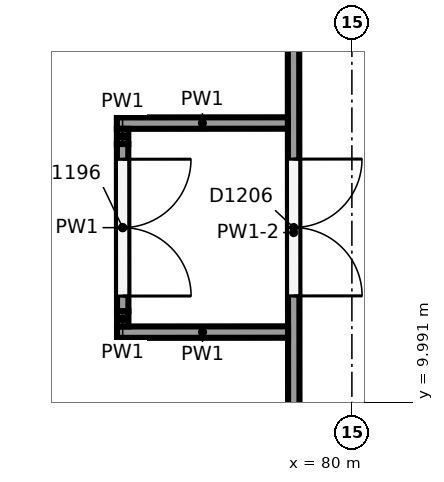
"""IFC4 building model, lengths in metres.
Left out: names, types, materials, properties, quantities, classifications, styles, units other than length and angle.
Written with IfcOpenShell. Run it as: python <this file> out.ifc"""

import sys

from ifc_helpers import new_model, si_unit, direction, frame, frame_2d, origin, place, context, subcontext, project, spatial, rectangle, extrude, element, fill, save


model = new_model("IFC4")
c1 = context("Model", 3, precision=1e-05, world=origin(), true_north=direction((0.0, 1.0)))
c2 = subcontext(c1, "Body", "Model", "MODEL_VIEW")
j1 = project(units=[si_unit("LENGTHUNIT", "METRE"), si_unit("PLANEANGLEUNIT", "RADIAN")], contexts=[c1])
p1 = place(None, origin())
s1 = spatial("IfcSite", under=j1, at=p1, CompositionType="ELEMENT")
p2 = place(p1, origin())
s2 = spatial("IfcBuilding", under=s1, at=p2, CompositionType="ELEMENT")
p3 = place(p2, frame((0.0, 0.0, 12.0)))
s3 = spatial("IfcBuildingStorey", under=s2, at=p3, CompositionType="ELEMENT", Elevation=12.0)
p4 = place(p3, frame((79.23, 17.64, 0.0), z_axis=(0.0, 0.0, 1.0), x_axis=(0.0007662833, -0.999999706405, 0.0)))
e1 = element("IfcWall", 1, at=p4, inside=s3, PredefinedType="PARTITIONING", context=c2, shape_type="SweptSolid", body=[
    extrude(rectangle(XDim=10.833, YDim=0.15, at=frame_2d((5.416, 0.0))), origin(), (0.0, 0.0, 1.0), 4.2),
])
p5 = place(p4, frame((4.45, 0.0, 0.0)))
e2 = element("IfcOpeningElement", 2, at=p5, cuts=e1, PredefinedType="OPENING", context=c2, shape_type="SweptSolid", body=[
    extrude(rectangle(XDim=1.8, YDim=2.1, at=frame_2d((0.9, 1.05))), frame((0.0, 0.085, 0.0), z_axis=(0.0, -1.0, 0.0), x_axis=(1.0, 0.0, 0.0)), (0.0, 0.0, 1.0), 0.17),
])
for number, where, z_axis, x_axis in (
    (3, (79.158, 13.665, 0.0), (0.0, 0.0, 1.0), (-1.0, -0.001, 0.0)),
    (4, (79.16, 10.915, 0.0), (0.0, 0.0, 1.0), (-1.0, -0.001, 0.0)),
):
    element("IfcWall", number, at=place(p3, frame(where, z_axis=z_axis, x_axis=x_axis)), inside=s3, PredefinedType="PARTITIONING", context=c2, shape_type="SweptSolid", body=[
        extrude(rectangle(XDim=2.25, YDim=0.15, at=frame_2d((1.125, 0.0))), origin(), (0.0, 0.0, 1.0), 5.65),
    ])
p6 = place(p3, frame((76.983, 13.588, 0.0), z_axis=(0.0, 0.0, 1.0), x_axis=(0.0, -1.0, 0.0)))
e5 = element("IfcWall", 5, at=p6, inside=s3, PredefinedType="PARTITIONING", context=c2, shape_type="SweptSolid", body=[
    extrude(rectangle(XDim=0.2, YDim=0.15, at=frame_2d((0.1, 0.0))), origin(), (0.0, 0.0, 1.0), 5.65),
])
p7 = place(p3, frame((76.983, 13.388, 0.0), z_axis=(0.0, 0.0, 1.0), x_axis=(0.000776828087, -0.999999698269, 0.0)))
e6 = element("IfcWall", 6, at=p7, inside=s3, PredefinedType="PARTITIONING", context=c2, shape_type="SweptSolid", body=[
    extrude(rectangle(XDim=2.2, YDim=0.15, at=frame_2d((1.1, 0.0))), origin(), (0.0, 0.0, 1.0), 5.65),
])
p8 = place(p7, frame((0.2, 0.0, 0.0)))
e7 = element("IfcOpeningElement", 7, at=p8, cuts=e6, PredefinedType="OPENING", context=c2, shape_type="SweptSolid", body=[
    extrude(rectangle(XDim=1.8, YDim=2.1, at=frame_2d((0.9, 1.05))), frame((0.0, 0.085, 0.0), z_axis=(0.0, -1.0, 0.0), x_axis=(1.0, 0.0, 0.0)), (0.0, 0.0, 1.0), 0.17),
])
p9 = place(p3, frame((76.985, 11.188, 0.0), z_axis=(0.0, 0.0, 1.0), x_axis=(0.001221000311, -0.999999254579, 0.0)))
e8 = element("IfcWall", 8, at=p9, inside=s3, PredefinedType="PARTITIONING", context=c2, shape_type="SweptSolid", body=[
    extrude(rectangle(XDim=0.2, YDim=0.15, at=frame_2d((0.1, 0.0))), origin(), (0.0, 0.0, 1.0), 5.65),
])
p10 = place(p5, origin())
e9 = element("IfcDoor", 9, at=p10, inside=s3, OperationType="DOUBLE_DOOR_SINGLE_SWING", PredefinedType="DOOR", context=c2, shape_type="SweptSolid", body=[
    extrude(rectangle(XDim=1.8, YDim=2.1, at=frame_2d((0.9, 1.05))), frame((0.0, 0.025, 0.0), z_axis=(0.0, -1.0, 0.0), x_axis=(1.0, 0.0, 0.0)), (0.0, 0.0, 1.0), 0.05),
])
fill(e2, e9)
p11 = place(p8, origin())
e10 = element("IfcDoor", 10, at=p11, inside=s3, OperationType="DOUBLE_DOOR_SINGLE_SWING", PredefinedType="DOOR", context=c2, shape_type="SweptSolid", body=[
    extrude(rectangle(XDim=1.8, YDim=2.1, at=frame_2d((0.9, 1.05))), frame((0.0, 0.025, 0.0), z_axis=(0.0, -1.0, 0.0), x_axis=(1.0, 0.0, 0.0)), (0.0, 0.0, 1.0), 0.05),
])
fill(e7, e10)
save(model, sys.argv[1])
